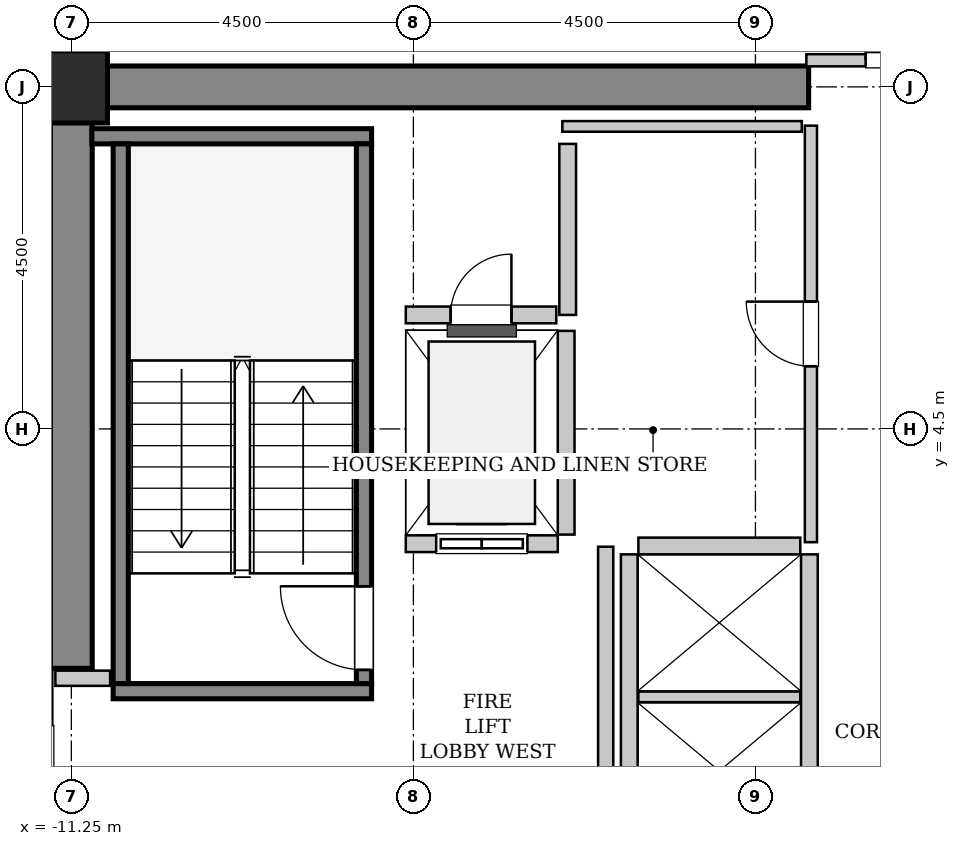
"""IFC4 building model, lengths in metres.
Left out: names, types, materials, properties, quantities, classifications, styles, units other than length and angle.
Written with IfcOpenShell. Run it as: python <this file> out.ifc"""

import sys

from ifc_helpers import new_model, si_unit, direction, frame, frame_2d, origin, origin_2d, place, context, subcontext, project, spatial, rectangle, hollow_rectangle, extrude, source, transform, mapped, element, fill, save


model = new_model("IFC4")
c1 = context("Model", 3, precision=1e-05, world=origin(), true_north=direction((0.0, 1.0)))
c2 = subcontext(c1, "Body", "Model", "MODEL_VIEW")
j1 = project(units=[si_unit("LENGTHUNIT", "METRE"), si_unit("PLANEANGLEUNIT", "RADIAN")], contexts=[c1])
p1 = place(None, origin())
s1 = spatial("IfcSite", under=j1, at=p1, CompositionType="ELEMENT")
p2 = place(p1, origin())
s2 = spatial("IfcBuilding", under=s1, at=p2, CompositionType="ELEMENT")
p3 = place(p2, frame((0.0, 0.0, 179.2)))
s3 = spatial("IfcBuildingStorey", under=s2, at=p3, CompositionType="ELEMENT", Elevation=179.2)
m1 = source(origin(), c2, "Body", "SweptSolid", [
    extrude(rectangle(XDim=9.975, YDim=0.55, at=frame_2d((4.987, 0.0))), origin(), (0.0, 0.0, 1.0), 3.8),
])
p4 = place(p3, frame((-11.525, 9.0, 0.0), z_axis=(0.0, 0.0, 1.0), x_axis=(1.0, 0.0, 0.0)))
e1 = element("IfcWall", 1, at=p4, inside=s3, PredefinedType="SHEAR", context=c2, shape_type="MappedRepresentation", body=[
    mapped(m1, transform((0.0, 0.0, 0.0), x_axis=(1.0, 0.0, 0.0), y_axis=(0.0, 1.0, 0.0), z_axis=(0.0, 0.0, 1.0), scale=1.0)),
])
m2 = source(origin(), c2, "Body", "SweptSolid", [
    extrude(rectangle(XDim=7.375, YDim=0.55, at=frame_2d((3.688, 0.0))), origin(), (0.0, 0.0, 1.0), 3.8),
])
p5 = place(p3, frame((-11.25, 1.35, 0.0), z_axis=(0.0, 0.0, 1.0), x_axis=(0.0, 1.0, 0.0)))
e2 = element("IfcWall", 2, at=p5, inside=s3, PredefinedType="SHEAR", context=c2, shape_type="MappedRepresentation", body=[
    mapped(m2, transform((0.0, 0.0, 0.0), x_axis=(1.0, 0.0, 0.0), y_axis=(0.0, 1.0, 0.0), z_axis=(0.0, 0.0, 1.0), scale=1.0)),
])
m3 = source(origin(), c2, "Body", "SweptSolid", [
    extrude(hollow_rectangle(XDim=0.95, YDim=0.95, WallThickness=0.045, InnerFilletRadius=0.045, OuterFilletRadius=0.09, at=origin_2d()), origin(), (0.0, 0.0, 1.0), 3.8),
])
p6 = place(p3, frame((-11.25, 9.0, 0.0), z_axis=(0.0, 0.0, 1.0), x_axis=(1.0, 0.0, 0.0)))
e3 = element("IfcColumn", 3, at=p6, inside=s3, PredefinedType="COLUMN", context=c2, shape_type="MappedRepresentation", body=[
    mapped(m3, transform((0.0, 0.0, 0.0), x_axis=(1.0, 0.0, 0.0), y_axis=(0.0, 1.0, 0.0), z_axis=(0.0, 0.0, 1.0), scale=1.0)),
])
m4 = source(origin(), c2, "Body", "SweptSolid", [
    extrude(rectangle(XDim=3.4, YDim=0.2, at=frame_2d((1.7, 0.0))), origin(), (0.0, 0.0, 1.0), 3.8),
])
p7 = place(p3, frame((-7.3, 1.05, 0.0), z_axis=(0.0, 0.0, 1.0), x_axis=(-1.0, 0.0, 0.0)))
e4 = element("IfcWall", 4, at=p7, inside=s3, PredefinedType="SOLIDWALL", context=c2, shape_type="MappedRepresentation", body=[
    mapped(m4, transform((0.0, 0.0, 0.0), x_axis=(1.0, 0.0, 0.0), y_axis=(0.0, 1.0, 0.0), z_axis=(0.0, 0.0, 1.0), scale=1.0)),
])
m5 = source(origin(), c2, "Body", "SweptSolid", [
    extrude(rectangle(XDim=3.68, YDim=0.2, at=frame_2d((1.84, 0.0))), origin(), (0.0, 0.0, 1.0), 3.8),
])
p8 = place(p3, frame((-7.3, 8.35, 0.0), z_axis=(0.0, 0.0, 1.0), x_axis=(-1.0, 0.0, 0.0)))
e5 = element("IfcWall", 5, at=p8, inside=s3, PredefinedType="SOLIDWALL", context=c2, shape_type="MappedRepresentation", body=[
    mapped(m5, transform((0.0, 0.0, 0.0), x_axis=(1.0, 0.0, 0.0), y_axis=(0.0, 1.0, 0.0), z_axis=(0.0, 0.0, 1.0), scale=1.0)),
])
m6 = source(origin(), c2, "Body", "SweptSolid", [
    extrude(rectangle(XDim=7.1, YDim=0.2, at=frame_2d((3.55, 0.0))), origin(), (0.0, 0.0, 1.0), 3.8),
])
p9 = place(p3, frame((-7.4, 1.15, 0.0), z_axis=(0.0, 0.0, 1.0), x_axis=(0.0, 1.0, 0.0)))
e6 = element("IfcWall", 6, at=p9, inside=s3, PredefinedType="SOLIDWALL", context=c2, shape_type="MappedRepresentation", body=[
    mapped(m6, transform((0.0, 0.0, 0.0), x_axis=(1.0, 0.0, 0.0), y_axis=(0.0, 1.0, 0.0), z_axis=(0.0, 0.0, 1.0), scale=1.0)),
])
p10 = place(p9, frame((0.18, 0.0, 0.0)))
e7 = element("IfcOpeningElement", 7, at=p10, cuts=e6, PredefinedType="OPENING", context=c2, shape_type="SweptSolid", body=[
    extrude(rectangle(XDim=1.1, YDim=2.15, at=frame_2d((0.55, 1.075))), frame((0.0, 0.11, 0.0), z_axis=(0.0, -1.0, 0.0), x_axis=(1.0, 0.0, 0.0)), (0.0, 0.0, 1.0), 0.22),
])
p11 = place(p3, frame((-10.6, 1.15, 0.0), z_axis=(0.0, 0.0, 1.0), x_axis=(0.0, 1.0, 0.0)))
e8 = element("IfcWall", 8, at=p11, inside=s3, PredefinedType="SOLIDWALL", context=c2, shape_type="MappedRepresentation", body=[
    mapped(m6, transform((0.0, 0.0, 0.0), x_axis=(1.0, 0.0, 0.0), y_axis=(0.0, 1.0, 0.0), z_axis=(0.0, 0.0, 1.0), scale=1.0)),
])
m7 = source(origin(), c2, "Body", "SweptSolid", [
    extrude(rectangle(XDim=2.0, YDim=0.22, at=frame_2d((1.0, 0.0))), origin(), (0.0, 0.0, 1.0), 3.535),
])
p12 = place(p3, frame((-6.85, 2.99, 0.0), z_axis=(0.0, 0.0, 1.0), x_axis=(1.0, 0.0, 0.0)))
e9 = element("IfcWall", 9, at=p12, inside=s3, PredefinedType="SOLIDWALL", context=c2, shape_type="MappedRepresentation", body=[
    mapped(m7, transform((0.0, 0.0, 0.0), x_axis=(1.0, 0.0, 0.0), y_axis=(0.0, 1.0, 0.0), z_axis=(0.0, 0.0, 1.0), scale=1.0)),
])
p13 = place(p12, frame((0.4, 0.0, 0.0)))
e10 = element("IfcOpeningElement", 10, at=p13, cuts=e9, PredefinedType="OPENING", context=c2, shape_type="SweptSolid", body=[
    extrude(rectangle(XDim=1.2, YDim=2.2, at=frame_2d((0.6, 1.1))), frame((0.0, 0.12, 0.0), z_axis=(0.0, -1.0, 0.0), x_axis=(1.0, 0.0, 0.0)), (0.0, 0.0, 1.0), 0.24),
])
m8 = source(origin(), c2, "Body", "SweptSolid", [
    extrude(rectangle(XDim=2.68, YDim=0.22, at=frame_2d((1.34, 0.0))), origin(), (0.0, 0.0, 1.0), 3.535),
])
p14 = place(p3, frame((-4.74, 3.11, 0.0), z_axis=(0.0, 0.0, 1.0), x_axis=(0.0, 1.0, 0.0)))
e11 = element("IfcWall", 11, at=p14, inside=s3, PredefinedType="SOLIDWALL", context=c2, shape_type="MappedRepresentation", body=[
    mapped(m8, transform((0.0, 0.0, 0.0), x_axis=(1.0, 0.0, 0.0), y_axis=(0.0, 1.0, 0.0), z_axis=(0.0, 0.0, 1.0), scale=1.0)),
])
m9 = source(origin(), c2, "Body", "SweptSolid", [
    extrude(rectangle(XDim=5.7, YDim=0.22, at=frame_2d((2.85, 0.0))), origin(), (0.0, 0.0, 1.0), 3.535),
])
for number, where, z_axis, x_axis in (
    (12, (-1.54, -2.85, 0.0), (0.0, 0.0, 1.0), (0.0, 1.0, 0.0)),
    (13, (-3.91, 2.85, 0.0), (0.0, 0.0, 1.0), (0.0, -1.0, 0.0)),
):
    element("IfcWall", number, at=place(p3, frame(where, z_axis=z_axis, x_axis=x_axis)), inside=s3, PredefinedType="SOLIDWALL", context=c2, shape_type="MappedRepresentation", body=[
        mapped(m9, transform((0.0, 0.0, 0.0), x_axis=(1.0, 0.0, 0.0), y_axis=(0.0, 1.0, 0.0), z_axis=(0.0, 0.0, 1.0), scale=1.0)),
    ])
m10 = source(origin(), c2, "Body", "SweptSolid", [
    extrude(rectangle(XDim=2.13, YDim=0.14, at=frame_2d((1.065, 0.0))), origin(), (0.0, 0.0, 1.0), 3.535),
])
p15 = place(p3, frame((-3.79, 0.975, 0.0), z_axis=(0.0, 0.0, 1.0), x_axis=(1.0, 0.0, 0.0)))
e14 = element("IfcWall", 14, at=p15, inside=s3, PredefinedType="PARTITIONING", context=c2, shape_type="MappedRepresentation", body=[
    mapped(m10, transform((0.0, 0.0, 0.0), x_axis=(1.0, 0.0, 0.0), y_axis=(0.0, 1.0, 0.0), z_axis=(0.0, 0.0, 1.0), scale=1.0)),
])
m11 = source(origin(), c2, "Body", "SweptSolid", [
    extrude(rectangle(XDim=2.13, YDim=0.22, at=frame_2d((1.065, 0.0))), origin(), (0.0, 0.0, 1.0), 3.535),
])
p16 = place(p3, frame((-1.66, 2.96, 0.0), z_axis=(0.0, 0.0, 1.0), x_axis=(-1.0, 0.0, 0.0)))
e15 = element("IfcWall", 15, at=p16, inside=s3, PredefinedType="SOLIDWALL", context=c2, shape_type="MappedRepresentation", body=[
    mapped(m11, transform((0.0, 0.0, 0.0), x_axis=(1.0, 0.0, 0.0), y_axis=(0.0, 1.0, 0.0), z_axis=(0.0, 0.0, 1.0), scale=1.0)),
])
m12 = source(origin(), c2, "Body", "SweptSolid", [
    extrude(rectangle(XDim=2.25, YDim=0.22, at=frame_2d((1.125, 0.0))), origin(), (0.0, 0.0, 1.0), 3.535),
])
p17 = place(p3, frame((-4.72, 6.0, 0.0), z_axis=(0.0, 0.0, 1.0), x_axis=(0.0, 1.0, 0.0)))
e16 = element("IfcWall", 16, at=p17, inside=s3, PredefinedType="SOLIDWALL", context=c2, shape_type="MappedRepresentation", body=[
    mapped(m12, transform((0.0, 0.0, 0.0), x_axis=(1.0, 0.0, 0.0), y_axis=(0.0, 1.0, 0.0), z_axis=(0.0, 0.0, 1.0), scale=1.0)),
])
m13 = source(origin(), c2, "Body", "SweptSolid", [
    extrude(rectangle(XDim=1.98, YDim=0.22, at=frame_2d((0.99, 0.0))), origin(), (0.0, 0.0, 1.0), 3.535),
])
p18 = place(p3, frame((-6.85, 6.0, 0.0), z_axis=(0.0, 0.0, 1.0), x_axis=(1.0, 0.0, 0.0)))
e17 = element("IfcWall", 17, at=p18, inside=s3, PredefinedType="SOLIDWALL", context=c2, shape_type="MappedRepresentation", body=[
    mapped(m13, transform((0.0, 0.0, 0.0), x_axis=(1.0, 0.0, 0.0), y_axis=(0.0, 1.0, 0.0), z_axis=(0.0, 0.0, 1.0), scale=1.0)),
])
p19 = place(p18, frame((0.59, 0.0, 0.0)))
e18 = element("IfcOpeningElement", 18, at=p19, cuts=e17, PredefinedType="OPENING", context=c2, shape_type="SweptSolid", body=[
    extrude(rectangle(XDim=0.8, YDim=2.0, at=frame_2d((0.4, 1.0))), frame((0.0, 0.12, 0.0), z_axis=(0.0, -1.0, 0.0), x_axis=(1.0, 0.0, 0.0)), (0.0, 0.0, 1.0), 0.24),
])
m14 = source(origin(), c2, "Body", "SweptSolid", [
    extrude(rectangle(XDim=5.9, YDim=0.2, at=frame_2d((2.95, 0.0))), origin(), (0.0, 0.0, 1.0), 3.535),
])
p20 = place(p3, frame((-4.22, -2.95, 0.0), z_axis=(0.0, 0.0, 1.0), x_axis=(0.0, 1.0, 0.0)))
e19 = element("IfcWall", 19, at=p20, inside=s3, PredefinedType="PARTITIONING", context=c2, shape_type="MappedRepresentation", body=[
    mapped(m14, transform((0.0, 0.0, 0.0), x_axis=(1.0, 0.0, 0.0), y_axis=(0.0, 1.0, 0.0), z_axis=(0.0, 0.0, 1.0), scale=1.0)),
])
m15 = source(origin(), c2, "Body", "SweptSolid", [
    extrude(rectangle(XDim=0.72, YDim=0.2, at=frame_2d((0.36, 0.0))), origin(), (0.0, 0.0, 1.0), 3.535),
])
p21 = place(p3, frame((-11.46, 1.22, 0.0), z_axis=(0.0, 0.0, 1.0), x_axis=(1.0, 0.0, 0.0)))
e20 = element("IfcWall", 20, at=p21, inside=s3, PredefinedType="PARTITIONING", context=c2, shape_type="MappedRepresentation", body=[
    mapped(m15, transform((0.0, 0.0, 0.0), x_axis=(1.0, 0.0, 0.0), y_axis=(0.0, 1.0, 0.0), z_axis=(0.0, 0.0, 1.0), scale=1.0)),
])
m16 = source(origin(), c2, "Body", "SweptSolid", [
    extrude(rectangle(XDim=3.16, YDim=0.16, at=frame_2d((1.58, 0.0))), origin(), (0.0, 0.0, 1.0), 2.425),
])
p22 = place(p3, frame((-1.58, 9.35, 0.0), z_axis=(0.0, 0.0, 1.0), x_axis=(1.0, 0.0, 0.0)))
e21 = element("IfcWall", 21, at=p22, inside=s3, PredefinedType="PARTITIONING", context=c2, shape_type="MappedRepresentation", body=[
    mapped(m16, transform((0.0, 0.0, 0.0), x_axis=(1.0, 0.0, 0.0), y_axis=(0.0, 1.0, 0.0), z_axis=(0.0, 0.0, 1.0), scale=1.0)),
])
p23 = place(p22, frame((0.78, 0.0, 0.0)))
e22 = element("IfcOpeningElement", 22, at=p23, cuts=e21, PredefinedType="OPENING", context=c2, shape_type="SweptSolid", body=[
    extrude(rectangle(XDim=1.6, YDim=2.3, at=frame_2d((0.8, 1.15))), frame((0.0, 0.09, 0.0), z_axis=(0.0, -1.0, 0.0), x_axis=(1.0, 0.0, 0.0)), (0.0, 0.0, 1.0), 0.18),
])
m17 = source(origin(), c2, "Body", "SweptSolid", [
    extrude(rectangle(XDim=5.48, YDim=0.16, at=frame_2d((2.74, 0.0))), origin(), (0.0, 0.0, 1.0), 3.535),
])
p24 = place(p3, frame((-1.52, 3.01, 0.0), z_axis=(0.0, 0.0, 1.0), x_axis=(0.0, 1.0, 0.0)))
e23 = element("IfcWall", 23, at=p24, inside=s3, PredefinedType="PARTITIONING", context=c2, shape_type="MappedRepresentation", body=[
    mapped(m17, transform((0.0, 0.0, 0.0), x_axis=(1.0, 0.0, 0.0), y_axis=(0.0, 1.0, 0.0), z_axis=(0.0, 0.0, 1.0), scale=1.0)),
])
p25 = place(p24, frame((2.315, 0.0, 0.0)))
e24 = element("IfcOpeningElement", 24, at=p25, cuts=e23, PredefinedType="OPENING", context=c2, shape_type="SweptSolid", body=[
    extrude(rectangle(XDim=0.85, YDim=2.1, at=frame_2d((0.425, 1.05))), frame((0.0, 0.09, 0.0), z_axis=(0.0, -1.0, 0.0), x_axis=(1.0, 0.0, 0.0)), (0.0, 0.0, 1.0), 0.18),
])
m18 = source(origin(), c2, "Body", "SweptSolid", [
    extrude(rectangle(XDim=3.15, YDim=0.14, at=frame_2d((1.575, 0.0))), origin(), (0.0, 0.0, 1.0), 3.535),
])
p26 = place(p3, frame((-4.79, 8.48, 0.0), z_axis=(0.0, 0.0, 1.0), x_axis=(1.0, 0.0, 0.0)))
e25 = element("IfcWall", 25, at=p26, inside=s3, PredefinedType="PARTITIONING", context=c2, shape_type="MappedRepresentation", body=[
    mapped(m18, transform((0.0, 0.0, 0.0), x_axis=(1.0, 0.0, 0.0), y_axis=(0.0, 1.0, 0.0), z_axis=(0.0, 0.0, 1.0), scale=1.0)),
])
m19 = source(origin(), c2, "Body", "SweptSolid", [
    extrude(rectangle(XDim=1.1, YDim=2.15, at=frame_2d((0.55, 1.075))), frame((0.0, 0.025, 0.0), z_axis=(0.0, -1.0, 0.0), x_axis=(1.0, 0.0, 0.0)), (0.0, 0.0, 1.0), 0.05),
])
p27 = place(p10, origin())
e26 = element("IfcDoor", 26, at=p27, inside=s3, OperationType="SINGLE_SWING_RIGHT", PredefinedType="DOOR", context=c2, shape_type="MappedRepresentation", body=[
    mapped(m19, transform((0.0, 0.0, 0.0), x_axis=(1.0, 0.0, 0.0), y_axis=(0.0, 1.0, 0.0), z_axis=(0.0, 0.0, 1.0), scale=1.0)),
])
fill(e7, e26)
m20 = source(origin(), c2, "Body", "SweptSolid", [
    extrude(rectangle(XDim=1.2, YDim=2.2, at=frame_2d((0.6, 1.1))), frame((0.0, 0.025, 0.0), z_axis=(0.0, -1.0, 0.0), x_axis=(1.0, 0.0, 0.0)), (0.0, 0.0, 1.0), 0.05),
])
p28 = place(p13, origin())
e27 = element("IfcDoor", 27, at=p28, inside=s3, OperationType="SLIDING_TO_LEFT", PredefinedType="DOOR", context=c2, shape_type="MappedRepresentation", body=[
    mapped(m20, transform((0.0, 0.0, 0.0), x_axis=(1.0, 0.0, 0.0), y_axis=(0.0, 1.0, 0.0), z_axis=(0.0, 0.0, 1.0), scale=1.0)),
])
fill(e10, e27)
m21 = source(origin(), c2, "Body", "SweptSolid", [
    extrude(rectangle(XDim=0.8, YDim=2.0, at=frame_2d((0.4, 1.0))), frame((0.0, 0.025, 0.0), z_axis=(0.0, -1.0, 0.0), x_axis=(1.0, 0.0, 0.0)), (0.0, 0.0, 1.0), 0.05),
])
p29 = place(p19, origin())
e28 = element("IfcDoor", 28, at=p29, inside=s3, OperationType="SINGLE_SWING_RIGHT", PredefinedType="TRAPDOOR", context=c2, shape_type="MappedRepresentation", body=[
    mapped(m21, transform((0.0, 0.0, 0.0), x_axis=(1.0, 0.0, 0.0), y_axis=(0.0, 1.0, 0.0), z_axis=(0.0, 0.0, 1.0), scale=1.0)),
])
fill(e18, e28)
m22 = source(origin(), c2, "Body", "SweptSolid", [
    extrude(rectangle(XDim=1.6, YDim=2.3, at=frame_2d((0.8, 1.15))), frame((0.0, 0.025, 0.0), z_axis=(0.0, -1.0, 0.0), x_axis=(1.0, 0.0, 0.0)), (0.0, 0.0, 1.0), 0.05),
])
p30 = place(p23, origin())
e29 = element("IfcDoor", 29, at=p30, inside=s3, OperationType="DOUBLE_DOOR_SINGLE_SWING", PredefinedType="DOOR", context=c2, shape_type="MappedRepresentation", body=[
    mapped(m22, transform((0.0, 0.0, 0.0), x_axis=(1.0, 0.0, 0.0), y_axis=(0.0, 1.0, 0.0), z_axis=(0.0, 0.0, 1.0), scale=1.0)),
])
fill(e22, e29)
m23 = source(origin(), c2, "Body", "SweptSolid", [
    extrude(rectangle(XDim=0.85, YDim=2.1, at=frame_2d((0.425, 1.05))), frame((0.0, 0.025, 0.0), z_axis=(0.0, -1.0, 0.0), x_axis=(1.0, 0.0, 0.0)), (0.0, 0.0, 1.0), 0.05),
])
p31 = place(p25, origin())
e30 = element("IfcDoor", 30, at=p31, inside=s3, OperationType="SINGLE_SWING_RIGHT", PredefinedType="DOOR", context=c2, shape_type="MappedRepresentation", body=[
    mapped(m23, transform((0.0, 0.0, 0.0), x_axis=(1.0, 0.0, 0.0), y_axis=(0.0, 1.0, 0.0), z_axis=(0.0, 0.0, 1.0), scale=1.0)),
])
fill(e24, e30)
save(model, sys.argv[1])
